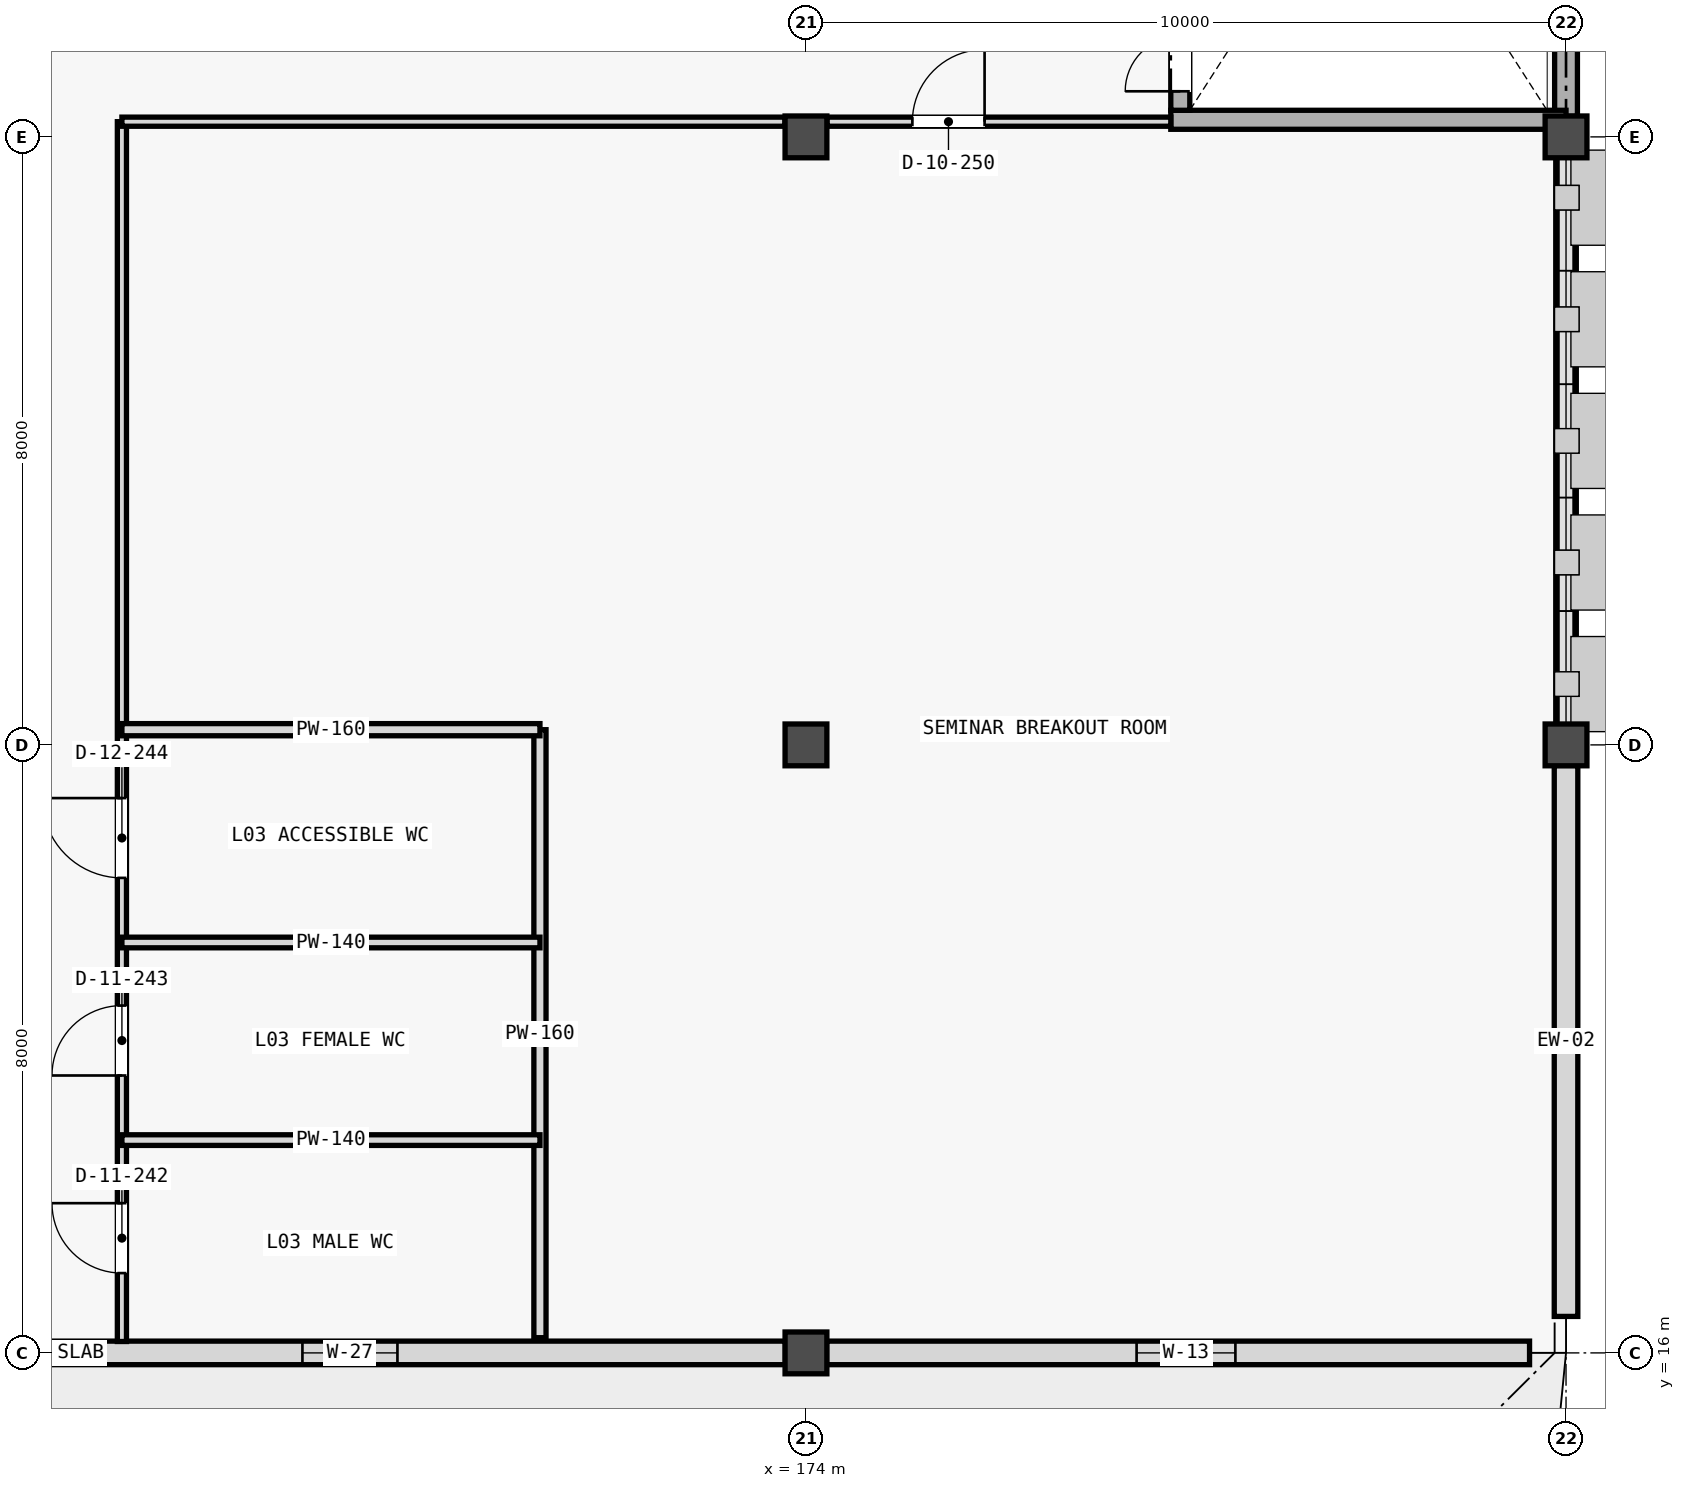
"""IFC4 building model, lengths in metres.
Left out: names, types, materials, properties, quantities, classifications, styles, units other than length and angle.
Written with IfcOpenShell. Run it as: python <this file> out.ifc"""

import sys

from ifc_helpers import new_model, si_unit, direction, frame, frame_2d, origin, origin_2d, place, context, subcontext, project, spatial, rectangle, extrude, element, fill, save


model = new_model("IFC4")
c1 = context("Model", 3, precision=1e-05, world=origin(), true_north=direction((0.0, 1.0)))
c2 = subcontext(c1, "Body", "Model", "MODEL_VIEW")
j1 = project(units=[si_unit("LENGTHUNIT", "METRE"), si_unit("PLANEANGLEUNIT", "RADIAN")], contexts=[c1])
p1 = place(None, origin())
s1 = spatial("IfcSite", under=j1, at=p1, CompositionType="ELEMENT")
p2 = place(p1, origin())
s2 = spatial("IfcBuilding", under=s1, at=p2, CompositionType="ELEMENT")
p3 = place(p2, frame((0.0, 0.0, 14.4)))
s3 = spatial("IfcBuildingStorey", under=s2, at=p3, CompositionType="ELEMENT", Elevation=14.4)
p4 = place(p3, frame((174.0, 16.0, 0.0), z_axis=(0.0, 0.0, 1.0), x_axis=(1.0, 0.0, 0.0)))
e1 = element("IfcColumn", 1, at=p4, inside=s3, PredefinedType="COLUMN", context=c2, shape_type="SweptSolid", body=[
    extrude(rectangle(XDim=0.55, YDim=0.55, at=origin_2d()), origin(), (0.0, 0.0, 1.0), 3.985),
])
for number, where, z_axis, x_axis in (
    (2, (174.0, 24.0, 0.0), (0.0, 0.0, 1.0), (1.0, 0.0, 0.0)),
    (3, (184.0, 24.0, 0.0), (0.0, 0.0, 1.0), (1.0, 0.0, 0.0)),
    (4, (174.0, 32.0, 0.0), (0.0, 0.0, 1.0), (1.0, 0.0, 0.0)),
    (5, (184.0, 32.0, 0.0), (0.0, 0.0, 1.0), (1.0, 0.0, 0.0)),
):
    element("IfcColumn", number, at=place(p3, frame(where, z_axis=z_axis, x_axis=x_axis)), inside=s3, PredefinedType="COLUMN", context=c2, shape_type="SweptSolid", body=[
        extrude(rectangle(XDim=0.55, YDim=0.55, at=origin_2d()), origin(), (0.0, 0.0, 1.0), 3.975),
    ])
p5 = place(p3, frame((184.0, 16.48, 0.0), z_axis=(0.0, 0.0, 1.0), x_axis=(0.0, 1.0, 0.0)))
e6 = element("IfcWall", 6, at=p5, inside=s3, PredefinedType="STANDARD", context=c2, shape_type="SweptSolid", body=[
    extrude(rectangle(XDim=7.249, YDim=0.31, at=frame_2d((3.625, 0.0))), origin(), (0.0, 0.0, 1.0), 3.3),
])
p6 = place(p3, frame((184.0, 24.271, 0.0), z_axis=(0.0, 0.0, 1.0), x_axis=(0.0, 1.0, 0.0)))
e7 = element("IfcWall", 7, at=p6, inside=s3, PredefinedType="STANDARD", context=c2, shape_type="SweptSolid", body=[
    extrude(rectangle(XDim=7.458, YDim=0.27, at=frame_2d((3.729, 0.0))), origin(), (0.0, 0.0, 1.0), 0.8),
])
p7 = place(p3, frame((184.0, 32.271, 0.0), z_axis=(0.0, 0.0, 1.0), x_axis=(0.0, 1.0, 0.0)))
e8 = element("IfcWall", 8, at=p7, inside=s3, PredefinedType="SHEAR", context=c2, shape_type="SweptSolid", body=[
    extrude(rectangle(XDim=7.458, YDim=0.3, at=frame_2d((3.729, 0.0))), origin(), (0.0, 0.0, 1.0), 4.2),
])
p8 = place(p3, frame((162.271, 16.0, 0.0), z_axis=(0.0, 0.0, 1.0), x_axis=(1.0, 0.0, 0.0)))
e9 = element("IfcWall", 9, at=p8, inside=s3, PredefinedType="STANDARD", context=c2, shape_type="SweptSolid", body=[
    extrude(rectangle(XDim=11.458, YDim=0.31, at=frame_2d((5.729, 0.0))), origin(), (0.0, 0.0, 1.0), 3.25),
])
p9 = place(p8, frame((5.104, 0.0, 0.95)))
e10 = element("IfcOpeningElement", 10, at=p9, cuts=e9, PredefinedType="OPENING", context=c2, shape_type="SweptSolid", body=[
    extrude(rectangle(XDim=1.25, YDim=1.35, at=frame_2d((0.625, 0.675))), frame((0.0, 0.165, 0.0), z_axis=(0.0, -1.0, 0.0), x_axis=(1.0, 0.0, 0.0)), (0.0, 0.0, 1.0), 0.33),
])
p10 = place(p3, frame((174.271, 16.0, 0.0), z_axis=(0.0, 0.0, 1.0), x_axis=(1.0, 0.0, 0.0)))
e11 = element("IfcWall", 11, at=p10, inside=s3, PredefinedType="STANDARD", context=c2, shape_type="SweptSolid", body=[
    extrude(rectangle(XDim=9.249, YDim=0.31, at=frame_2d((4.625, 0.0))), origin(), (0.0, 0.0, 1.0), 3.25),
])
p11 = place(p10, frame((4.079, 0.0, 0.95)))
e12 = element("IfcOpeningElement", 12, at=p11, cuts=e11, PredefinedType="OPENING", context=c2, shape_type="SweptSolid", body=[
    extrude(rectangle(XDim=1.3, YDim=1.4, at=frame_2d((0.65, 0.7))), frame((0.0, 0.165, 0.0), z_axis=(0.0, -1.0, 0.0), x_axis=(1.0, 0.0, 0.0)), (0.0, 0.0, 1.0), 0.33),
])
p12 = place(p3, frame((178.8, 32.225, 0.0), z_axis=(0.0, 0.0, 1.0), x_axis=(1.0, 0.0, 0.0)))
e13 = element("IfcWall", 13, at=p12, inside=s3, PredefinedType="SHEAR", context=c2, shape_type="SweptSolid", body=[
    extrude(rectangle(XDim=5.2, YDim=0.25, at=frame_2d((2.6, 0.0))), origin(), (0.0, 0.0, 1.0), 4.2),
])
p13 = place(p3, frame((178.925, 32.35, 0.0), z_axis=(0.0, 0.0, 1.0), x_axis=(0.0, 1.0, 0.0)))
e14 = element("IfcWall", 14, at=p13, inside=s3, PredefinedType="SHEAR", context=c2, shape_type="SweptSolid", body=[
    extrude(rectangle(XDim=7.3, YDim=0.25, at=frame_2d((3.65, 0.0))), origin(), (0.0, 0.0, 1.0), 4.2),
])
p14 = place(p13, frame((0.25, 0.0, 0.0)))
e15 = element("IfcOpeningElement", 15, at=p14, cuts=e14, PredefinedType="OPENING", context=c2, shape_type="SweptSolid", body=[
    extrude(rectangle(XDim=1.45, YDim=2.2, at=frame_2d((0.725, 1.1))), frame((0.0, 0.135, 0.0), z_axis=(0.0, -1.0, 0.0), x_axis=(1.0, 0.0, 0.0)), (0.0, 0.0, 1.0), 0.27),
])
p15 = place(p3, frame((165.0, 16.15, 0.0), z_axis=(0.0, 0.0, 1.0), x_axis=(0.0, 1.0, 0.0)))
e16 = element("IfcWall", 16, at=p15, inside=s3, PredefinedType="PARTITIONING", context=c2, shape_type="SweptSolid", body=[
    extrude(rectangle(XDim=16.05, YDim=0.12, at=frame_2d((8.025, 0.0))), origin(), (0.0, 0.0, 1.0), 3.355),
])
p16 = place(p15, frame((0.9, 0.0, 0.0)))
e17 = element("IfcOpeningElement", 17, at=p16, cuts=e16, PredefinedType="OPENING", context=c2, shape_type="SweptSolid", body=[
    extrude(rectangle(XDim=0.92, YDim=2.1, at=frame_2d((0.46, 1.05))), frame((0.0, 0.07, 0.0), z_axis=(0.0, -1.0, 0.0), x_axis=(1.0, 0.0, 0.0)), (0.0, 0.0, 1.0), 0.14),
])
p17 = place(p15, frame((3.5, 0.0, 0.0)))
e18 = element("IfcOpeningElement", 18, at=p17, cuts=e16, PredefinedType="OPENING", context=c2, shape_type="SweptSolid", body=[
    extrude(rectangle(XDim=0.92, YDim=2.1, at=frame_2d((0.46, 1.05))), frame((0.0, 0.07, 0.0), z_axis=(0.0, -1.0, 0.0), x_axis=(1.0, 0.0, 0.0)), (0.0, 0.0, 1.0), 0.14),
])
p18 = place(p15, frame((6.1, 0.0, 0.0)))
e19 = element("IfcOpeningElement", 19, at=p18, cuts=e16, PredefinedType="OPENING", context=c2, shape_type="SweptSolid", body=[
    extrude(rectangle(XDim=1.05, YDim=2.15, at=frame_2d((0.525, 1.075))), frame((0.0, 0.07, 0.0), z_axis=(0.0, -1.0, 0.0), x_axis=(1.0, 0.0, 0.0)), (0.0, 0.0, 1.0), 0.14),
])
p19 = place(p3, frame((170.5, 16.2, 0.0), z_axis=(0.0, 0.0, 1.0), x_axis=(0.0, 1.0, 0.0)))
e20 = element("IfcWall", 20, at=p19, inside=s3, PredefinedType="PARTITIONING", context=c2, shape_type="SweptSolid", body=[
    extrude(rectangle(XDim=8.0, YDim=0.16, at=frame_2d((4.0, 0.0))), origin(), (0.0, 0.0, 1.0), 3.355),
])
for number, where, z_axis, x_axis in (
    (21, (165.0, 18.8, 0.0), (0.0, 0.0, 1.0), (1.0, 0.0, 0.0)),
    (22, (165.0, 21.4, 0.0), (0.0, 0.0, 1.0), (1.0, 0.0, 0.0)),
):
    element("IfcWall", number, at=place(p3, frame(where, z_axis=z_axis, x_axis=x_axis)), inside=s3, PredefinedType="PLUMBINGWALL", context=c2, shape_type="SweptSolid", body=[
        extrude(rectangle(XDim=5.5, YDim=0.14, at=frame_2d((2.75, 0.0))), origin(), (0.0, 0.0, 1.0), 3.715),
    ])
p20 = place(p3, frame((165.0, 24.2, 0.0), z_axis=(0.0, 0.0, 1.0), x_axis=(1.0, 0.0, 0.0)))
e23 = element("IfcWall", 23, at=p20, inside=s3, PredefinedType="PARTITIONING", context=c2, shape_type="SweptSolid", body=[
    extrude(rectangle(XDim=5.5, YDim=0.16, at=frame_2d((2.75, 0.0))), origin(), (0.0, 0.0, 1.0), 3.355),
])
p21 = place(p3, frame((165.0, 32.2, 0.0), z_axis=(0.0, 0.0, 1.0), x_axis=(1.0, 0.0, 0.0)))
e24 = element("IfcWall", 24, at=p21, inside=s3, PredefinedType="PARTITIONING", context=c2, shape_type="SweptSolid", body=[
    extrude(rectangle(XDim=8.723, YDim=0.12, at=frame_2d((4.361, 0.0))), origin(), (0.0, 0.0, 1.0), 3.255),
])
p22 = place(p3, frame((174.277, 32.2, 0.0), z_axis=(0.0, 0.0, 1.0), x_axis=(1.0, 0.0, 0.0)))
e25 = element("IfcWall", 25, at=p22, inside=s3, PredefinedType="PARTITIONING", context=c2, shape_type="SweptSolid", body=[
    extrude(rectangle(XDim=4.523, YDim=0.12, at=frame_2d((2.261, 0.0))), origin(), (0.0, 0.0, 1.0), 3.255),
])
p23 = place(p22, frame((1.123, 0.0, 0.0)))
e26 = element("IfcOpeningElement", 26, at=p23, cuts=e25, PredefinedType="OPENING", context=c2, shape_type="SweptSolid", body=[
    extrude(rectangle(XDim=0.95, YDim=2.15, at=frame_2d((0.475, 1.075))), frame((0.0, 0.07, 0.0), z_axis=(0.0, -1.0, 0.0), x_axis=(1.0, 0.0, 0.0)), (0.0, 0.0, 1.0), 0.14),
])
p24 = place(p9, origin())
e27 = element("IfcWindow", 27, at=p24, inside=s3, PartitioningType="SINGLE_PANEL", PredefinedType="WINDOW", context=c2, shape_type="SweptSolid", body=[
    extrude(rectangle(XDim=1.25, YDim=1.35, at=frame_2d((0.625, 0.675))), frame((0.0, 0.03, 0.0), z_axis=(0.0, -1.0, 0.0), x_axis=(1.0, 0.0, 0.0)), (0.0, 0.0, 1.0), 0.06),
])
fill(e10, e27)
p25 = place(p11, origin())
e28 = element("IfcWindow", 28, at=p25, inside=s3, PartitioningType="SINGLE_PANEL", PredefinedType="WINDOW", context=c2, shape_type="SweptSolid", body=[
    extrude(rectangle(XDim=1.3, YDim=1.4, at=frame_2d((0.65, 0.7))), frame((0.0, 0.03, 0.0), z_axis=(0.0, -1.0, 0.0), x_axis=(1.0, 0.0, 0.0)), (0.0, 0.0, 1.0), 0.06),
])
fill(e12, e28)
p26 = place(p14, origin())
e29 = element("IfcDoor", 29, at=p26, inside=s3, OperationType="DOUBLE_DOOR_SINGLE_SWING", PredefinedType="DOOR", context=c2, shape_type="SweptSolid", body=[
    extrude(rectangle(XDim=1.45, YDim=2.2, at=frame_2d((0.725, 1.1))), frame((0.0, 0.025, 0.0), z_axis=(0.0, -1.0, 0.0), x_axis=(1.0, 0.0, 0.0)), (0.0, 0.0, 1.0), 0.05),
])
fill(e15, e29)
p27 = place(p16, origin())
e30 = element("IfcDoor", 30, at=p27, inside=s3, OperationType="SINGLE_SWING_RIGHT", PredefinedType="DOOR", context=c2, shape_type="SweptSolid", body=[
    extrude(rectangle(XDim=0.92, YDim=2.1, at=frame_2d((0.46, 1.05))), frame((0.0, 0.025, 0.0), z_axis=(0.0, -1.0, 0.0), x_axis=(1.0, 0.0, 0.0)), (0.0, 0.0, 1.0), 0.05),
])
fill(e17, e30)
p28 = place(p17, origin())
e31 = element("IfcDoor", 31, at=p28, inside=s3, OperationType="SINGLE_SWING_LEFT", PredefinedType="DOOR", context=c2, shape_type="SweptSolid", body=[
    extrude(rectangle(XDim=0.92, YDim=2.1, at=frame_2d((0.46, 1.05))), frame((0.0, 0.025, 0.0), z_axis=(0.0, -1.0, 0.0), x_axis=(1.0, 0.0, 0.0)), (0.0, 0.0, 1.0), 0.05),
])
fill(e18, e31)
p29 = place(p18, origin())
e32 = element("IfcDoor", 32, at=p29, inside=s3, OperationType="SINGLE_SWING_RIGHT", PredefinedType="DOOR", context=c2, shape_type="SweptSolid", body=[
    extrude(rectangle(XDim=1.05, YDim=2.15, at=frame_2d((0.525, 1.075))), frame((0.0, 0.025, 0.0), z_axis=(0.0, -1.0, 0.0), x_axis=(1.0, 0.0, 0.0)), (0.0, 0.0, 1.0), 0.05),
])
fill(e19, e32)
p30 = place(p23, origin())
e33 = element("IfcDoor", 33, at=p30, inside=s3, OperationType="SINGLE_SWING_RIGHT", PredefinedType="DOOR", context=c2, shape_type="SweptSolid", body=[
    extrude(rectangle(XDim=0.95, YDim=2.15, at=frame_2d((0.475, 1.075))), frame((0.0, 0.025, 0.0), z_axis=(0.0, -1.0, 0.0), x_axis=(1.0, 0.0, 0.0)), (0.0, 0.0, 1.0), 0.05),
])
fill(e26, e33)
save(model, sys.argv[1])
